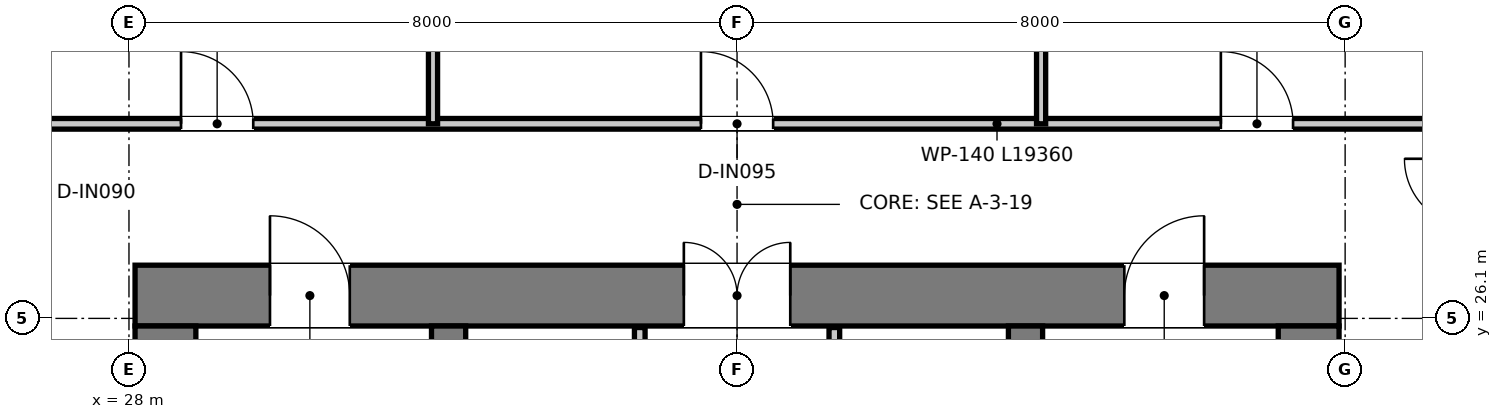
"""IFC4 building model, lengths in metres.
Left out: names, types, materials, properties, quantities, classifications, styles, units other than length and angle.
Written with IfcOpenShell. Run it as: python <this file> out.ifc"""

import sys

from ifc_helpers import new_model, si_unit, direction, frame, frame_2d, origin, place, context, subcontext, project, spatial, rectangle, extrude, element, fill, save


model = new_model("IFC4")
c1 = context("Model", 3, precision=1e-05, world=origin(), true_north=direction((0.0, 1.0)))
c2 = subcontext(c1, "Body", "Model", "MODEL_VIEW")
j1 = project(units=[si_unit("LENGTHUNIT", "METRE"), si_unit("PLANEANGLEUNIT", "RADIAN")], contexts=[c1])
p1 = place(None, origin())
s1 = spatial("IfcSite", under=j1, at=p1, CompositionType="ELEMENT")
p2 = place(p1, origin())
s2 = spatial("IfcBuilding", under=s1, at=p2, CompositionType="ELEMENT")
p3 = place(p2, frame((0.0, 0.0, 267.4)))
s3 = spatial("IfcBuildingStorey", under=s2, at=p3, CompositionType="ELEMENT", Elevation=267.4)
p4 = place(p3, frame((28.08, 26.4, 0.0), z_axis=(0.0, 0.0, 1.0), x_axis=(1.0, 0.0, 0.0)))
e1 = element("IfcWall", 1, at=p4, inside=s3, PredefinedType="SHEAR", context=c2, shape_type="SweptSolid", body=[
    extrude(rectangle(XDim=15.84, YDim=0.8, at=frame_2d((7.92, 0.0))), origin(), (0.0, 0.0, 1.0), 3.95),
])
p5 = place(p4, frame((7.22, 0.0, 0.0)))
e2 = element("IfcOpeningElement", 2, at=p5, cuts=e1, PredefinedType="OPENING", context=c2, shape_type="SweptSolid", body=[
    extrude(rectangle(XDim=1.4, YDim=2.2, at=frame_2d((0.7, 1.1))), frame((0.0, 0.41, 0.0), z_axis=(0.0, -1.0, 0.0), x_axis=(1.0, 0.0, 0.0)), (0.0, 0.0, 1.0), 0.82),
])
p6 = place(p4, frame((1.775, 0.0, 0.0)))
e3 = element("IfcOpeningElement", 3, at=p6, cuts=e1, PredefinedType="OPENING", context=c2, shape_type="SweptSolid", body=[
    extrude(rectangle(XDim=1.05, YDim=2.1, at=frame_2d((0.525, 1.05))), frame((0.0, 0.41, 0.0), z_axis=(0.0, -1.0, 0.0), x_axis=(1.0, 0.0, 0.0)), (0.0, 0.0, 1.0), 0.82),
])
p7 = place(p4, frame((13.015, 0.0, 0.0)))
e4 = element("IfcOpeningElement", 4, at=p7, cuts=e1, PredefinedType="OPENING", context=c2, shape_type="SweptSolid", body=[
    extrude(rectangle(XDim=1.05, YDim=2.1, at=frame_2d((0.525, 1.05))), frame((0.0, 0.41, 0.0), z_axis=(0.0, -1.0, 0.0), x_axis=(1.0, 0.0, 0.0)), (0.0, 0.0, 1.0), 0.82),
])
for number, where, z_axis, x_axis in (
    (5, (28.48, 11.3, 0.0), (0.0, 0.0, 1.0), (0.0, 1.0, 0.0)),
    (6, (43.52, 11.3, 0.0), (0.0, 0.0, 1.0), (0.0, 1.0, 0.0)),
):
    element("IfcWall", number, at=place(p3, frame(where, z_axis=z_axis, x_axis=x_axis)), inside=s3, PredefinedType="SHEAR", context=c2, shape_type="SweptSolid", body=[
        extrude(rectangle(XDim=14.7, YDim=0.8, at=frame_2d((7.35, 0.0))), origin(), (0.0, 0.0, 1.0), 3.95),
    ])
p8 = place(p3, frame((32.205, 13.22, 0.0), z_axis=(0.0, 0.0, 1.0), x_axis=(0.0, 1.0, 0.0)))
e7 = element("IfcWall", 7, at=p8, inside=s3, PredefinedType="SHEAR", context=c2, shape_type="SweptSolid", body=[
    extrude(rectangle(XDim=12.78, YDim=0.45, at=frame_2d((6.39, 0.0))), origin(), (0.0, 0.0, 1.0), 3.95),
])
p9 = place(p8, frame((10.58, 0.0, 0.0)))
e8 = element("IfcOpeningElement", 8, at=p9, cuts=e7, PredefinedType="OPENING", context=c2, shape_type="SweptSolid", body=[
    extrude(rectangle(XDim=1.1, YDim=2.15, at=frame_2d((0.55, 1.075))), frame((0.0, 0.235, 0.0), z_axis=(0.0, -1.0, 0.0), x_axis=(1.0, 0.0, 0.0)), (0.0, 0.0, 1.0), 0.47),
])
p10 = place(p3, frame((39.795, 13.22, 0.0), z_axis=(0.0, 0.0, 1.0), x_axis=(0.0, 1.0, 0.0)))
e9 = element("IfcWall", 9, at=p10, inside=s3, PredefinedType="SHEAR", context=c2, shape_type="SweptSolid", body=[
    extrude(rectangle(XDim=12.78, YDim=0.45, at=frame_2d((6.39, 0.0))), origin(), (0.0, 0.0, 1.0), 3.95),
])
p11 = place(p10, frame((10.58, 0.0, 0.0)))
e10 = element("IfcOpeningElement", 10, at=p11, cuts=e9, PredefinedType="OPENING", context=c2, shape_type="SweptSolid", body=[
    extrude(rectangle(XDim=1.1, YDim=2.15, at=frame_2d((0.55, 1.075))), frame((0.0, 0.235, 0.0), z_axis=(0.0, -1.0, 0.0), x_axis=(1.0, 0.0, 0.0)), (0.0, 0.0, 1.0), 0.47),
])
p12 = place(p3, frame((34.72, 20.2, 0.0), z_axis=(0.0, 0.0, 1.0), x_axis=(0.0, 1.0, 0.0)))
e11 = element("IfcWall", 11, at=p12, inside=s3, PredefinedType="PARTITIONING", context=c2, shape_type="SweptSolid", body=[
    extrude(rectangle(XDim=5.78, YDim=0.14, at=frame_2d((2.89, 0.0))), origin(), (0.0, 0.0, 1.0), 2.82),
])
p13 = place(p12, frame((1.05, 0.0, 0.0)))
e12 = element("IfcOpeningElement", 12, at=p13, cuts=e11, PredefinedType="OPENING", context=c2, shape_type="SweptSolid", body=[
    extrude(rectangle(XDim=0.9, YDim=2.1, at=frame_2d((0.45, 1.05))), frame((0.0, 0.08, 0.0), z_axis=(0.0, -1.0, 0.0), x_axis=(1.0, 0.0, 0.0)), (0.0, 0.0, 1.0), 0.16),
])
p14 = place(p3, frame((37.28, 20.2, 0.0), z_axis=(0.0, 0.0, 1.0), x_axis=(0.0, 1.0, 0.0)))
e13 = element("IfcWall", 13, at=p14, inside=s3, PredefinedType="PARTITIONING", context=c2, shape_type="SweptSolid", body=[
    extrude(rectangle(XDim=5.78, YDim=0.14, at=frame_2d((2.89, 0.0))), origin(), (0.0, 0.0, 1.0), 2.82),
])
p15 = place(p14, frame((0.95, 0.0, 0.0)))
e14 = element("IfcOpeningElement", 14, at=p15, cuts=e13, PredefinedType="OPENING", context=c2, shape_type="SweptSolid", body=[
    extrude(rectangle(XDim=1.1, YDim=2.15, at=frame_2d((0.55, 1.075))), frame((0.0, 0.08, 0.0), z_axis=(0.0, -1.0, 0.0), x_axis=(1.0, 0.0, 0.0)), (0.0, 0.0, 1.0), 0.16),
])
p16 = place(p3, frame((26.32, 28.66, 0.0), z_axis=(0.0, 0.0, 1.0), x_axis=(1.0, 0.0, 0.0)))
e15 = element("IfcWall", 15, at=p16, inside=s3, PredefinedType="PARTITIONING", context=c2, shape_type="SweptSolid", body=[
    extrude(rectangle(XDim=19.36, YDim=0.14, at=frame_2d((9.68, 0.0))), origin(), (0.0, 0.0, 1.0), 3.18),
])
p17 = place(p16, frame((2.365, 0.0, 0.0)))
e16 = element("IfcOpeningElement", 16, at=p17, cuts=e15, PredefinedType="OPENING", context=c2, shape_type="SweptSolid", body=[
    extrude(rectangle(XDim=0.95, YDim=2.1, at=frame_2d((0.475, 1.05))), frame((0.0, 0.08, 0.0), z_axis=(0.0, -1.0, 0.0), x_axis=(1.0, 0.0, 0.0)), (0.0, 0.0, 1.0), 0.16),
])
p18 = place(p16, frame((9.205, 0.0, 0.0)))
e17 = element("IfcOpeningElement", 17, at=p18, cuts=e15, PredefinedType="OPENING", context=c2, shape_type="SweptSolid", body=[
    extrude(rectangle(XDim=0.95, YDim=2.1, at=frame_2d((0.475, 1.05))), frame((0.0, 0.08, 0.0), z_axis=(0.0, -1.0, 0.0), x_axis=(1.0, 0.0, 0.0)), (0.0, 0.0, 1.0), 0.16),
])
p19 = place(p16, frame((16.045, 0.0, 0.0)))
e18 = element("IfcOpeningElement", 18, at=p19, cuts=e15, PredefinedType="OPENING", context=c2, shape_type="SweptSolid", body=[
    extrude(rectangle(XDim=0.95, YDim=2.1, at=frame_2d((0.475, 1.05))), frame((0.0, 0.08, 0.0), z_axis=(0.0, -1.0, 0.0), x_axis=(1.0, 0.0, 0.0)), (0.0, 0.0, 1.0), 0.16),
])
p20 = place(p3, frame((32.0, 28.66, 0.0), z_axis=(0.0, 0.0, 1.0), x_axis=(0.0, 1.0, 0.0)))
e19 = element("IfcWall", 19, at=p20, inside=s3, PredefinedType="PARTITIONING", context=c2, shape_type="SweptSolid", body=[
    extrude(rectangle(XDim=19.429, YDim=0.12, at=frame_2d((9.714, 0.0))), origin(), (0.0, 0.0, 1.0), 3.13),
])
p21 = place(p3, frame((40.0, 28.66, 0.0), z_axis=(0.0, 0.0, 1.0), x_axis=(0.0, 1.0, 0.0)))
e20 = element("IfcWall", 20, at=p21, inside=s3, PredefinedType="PARTITIONING", context=c2, shape_type="SweptSolid", body=[
    extrude(rectangle(XDim=18.635, YDim=0.12, at=frame_2d((9.318, 0.0))), origin(), (0.0, 0.0, 1.0), 3.13),
])
p22 = place(p5, origin())
e21 = element("IfcDoor", 21, at=p22, inside=s3, OperationType="DOUBLE_DOOR_SINGLE_SWING", PredefinedType="DOOR", context=c2, shape_type="SweptSolid", body=[
    extrude(rectangle(XDim=1.4, YDim=2.2, at=frame_2d((0.7, 1.1))), frame((0.0, 0.025, 0.0), z_axis=(0.0, -1.0, 0.0), x_axis=(1.0, 0.0, 0.0)), (0.0, 0.0, 1.0), 0.05),
])
fill(e2, e21)
p23 = place(p6, origin())
e22 = element("IfcDoor", 22, at=p23, inside=s3, OperationType="SINGLE_SWING_LEFT", PredefinedType="DOOR", context=c2, shape_type="SweptSolid", body=[
    extrude(rectangle(XDim=1.05, YDim=2.1, at=frame_2d((0.525, 1.05))), frame((0.0, 0.025, 0.0), z_axis=(0.0, -1.0, 0.0), x_axis=(1.0, 0.0, 0.0)), (0.0, 0.0, 1.0), 0.05),
])
fill(e3, e22)
p24 = place(p7, origin())
e23 = element("IfcDoor", 23, at=p24, inside=s3, OperationType="SINGLE_SWING_RIGHT", PredefinedType="DOOR", context=c2, shape_type="SweptSolid", body=[
    extrude(rectangle(XDim=1.05, YDim=2.1, at=frame_2d((0.525, 1.05))), frame((0.0, 0.025, 0.0), z_axis=(0.0, -1.0, 0.0), x_axis=(1.0, 0.0, 0.0)), (0.0, 0.0, 1.0), 0.05),
])
fill(e4, e23)
p25 = place(p17, origin())
e24 = element("IfcDoor", 24, at=p25, inside=s3, OperationType="SINGLE_SWING_LEFT", PredefinedType="DOOR", context=c2, shape_type="SweptSolid", body=[
    extrude(rectangle(XDim=0.95, YDim=2.1, at=frame_2d((0.475, 1.05))), frame((0.0, 0.025, 0.0), z_axis=(0.0, -1.0, 0.0), x_axis=(1.0, 0.0, 0.0)), (0.0, 0.0, 1.0), 0.05),
])
fill(e16, e24)
p26 = place(p18, origin())
e25 = element("IfcDoor", 25, at=p26, inside=s3, OperationType="SINGLE_SWING_LEFT", PredefinedType="DOOR", context=c2, shape_type="SweptSolid", body=[
    extrude(rectangle(XDim=0.95, YDim=2.1, at=frame_2d((0.475, 1.05))), frame((0.0, 0.025, 0.0), z_axis=(0.0, -1.0, 0.0), x_axis=(1.0, 0.0, 0.0)), (0.0, 0.0, 1.0), 0.05),
])
fill(e17, e25)
p27 = place(p19, origin())
e26 = element("IfcDoor", 26, at=p27, inside=s3, OperationType="SINGLE_SWING_LEFT", PredefinedType="DOOR", context=c2, shape_type="SweptSolid", body=[
    extrude(rectangle(XDim=0.95, YDim=2.1, at=frame_2d((0.475, 1.05))), frame((0.0, 0.025, 0.0), z_axis=(0.0, -1.0, 0.0), x_axis=(1.0, 0.0, 0.0)), (0.0, 0.0, 1.0), 0.05),
])
fill(e18, e26)
save(model, sys.argv[1])
